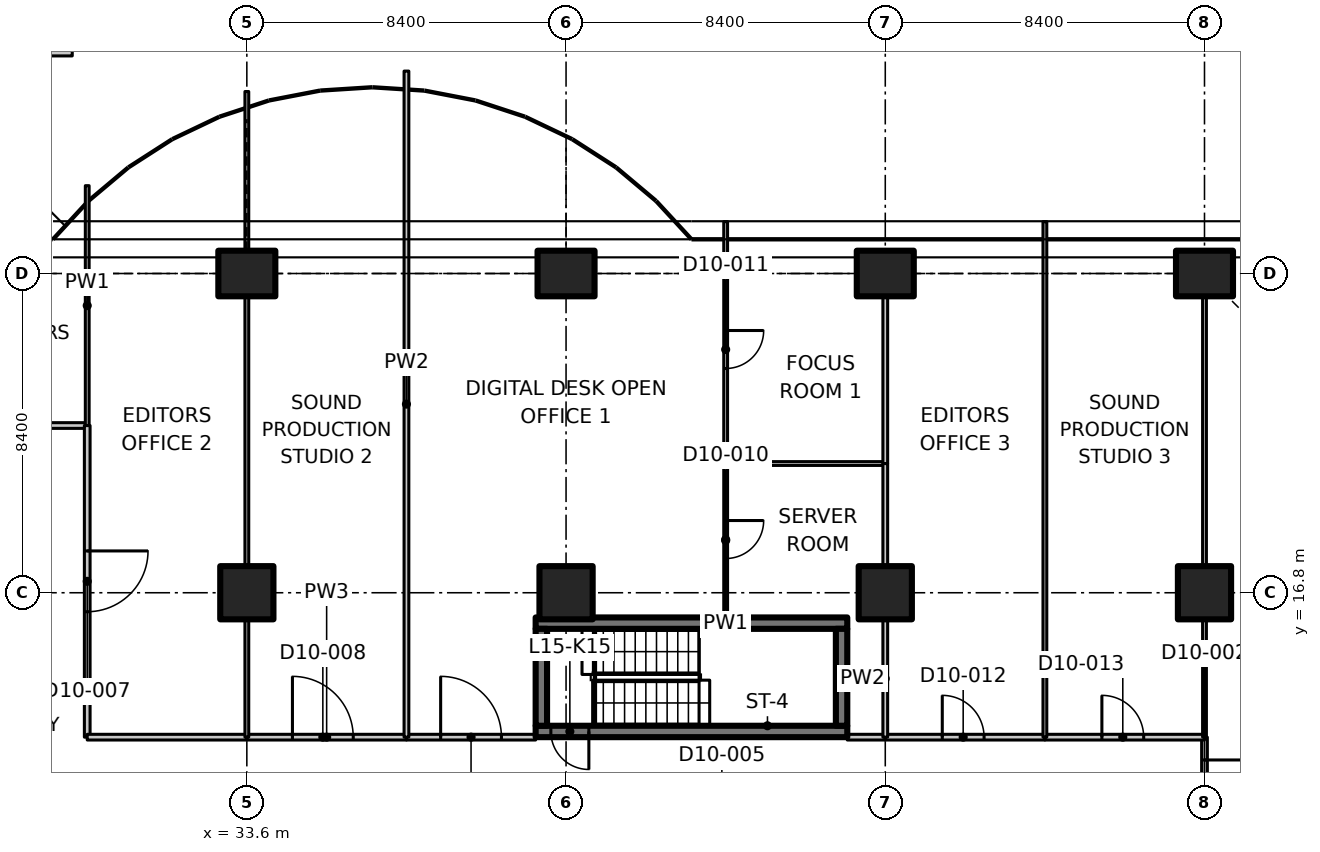
"""IFC4 building model, lengths in metres.
Left out: names, types, materials, properties, quantities, classifications, styles, units other than length and angle.
Written with IfcOpenShell. Run it as: python <this file> out.ifc"""

import sys

from ifc_helpers import new_model, si_unit, direction, frame, frame_2d, origin, origin_2d, place, context, subcontext, project, spatial, polyline, rectangle, outline, extrude, element, fill, save


model = new_model("IFC4")
c1 = context("Model", 3, precision=1e-05, world=origin(), true_north=direction((0.0, 1.0)))
c2 = subcontext(c1, "Body", "Model", "MODEL_VIEW")
j1 = project(units=[si_unit("LENGTHUNIT", "METRE"), si_unit("PLANEANGLEUNIT", "RADIAN")], contexts=[c1])
p1 = place(None, origin())
s1 = spatial("IfcSite", under=j1, at=p1, CompositionType="ELEMENT")
p2 = place(p1, origin())
s2 = spatial("IfcBuilding", under=s1, at=p2, CompositionType="ELEMENT")
p3 = place(p2, frame((0.0, 0.0, 68.9)))
s3 = spatial("IfcBuildingStorey", under=s2, at=p3, CompositionType="ELEMENT", Elevation=68.9)
p4 = place(p3, frame((33.6, 16.8, 0.0), z_axis=(0.0, 0.0, 1.0), x_axis=(1.0, 0.0, 0.0)))
e1 = element("IfcColumn", 1, at=p4, inside=s3, PredefinedType="COLUMN", context=c2, shape_type="SweptSolid", body=[
    extrude(rectangle(XDim=1.4, YDim=1.4, at=origin_2d()), origin(), (0.0, 0.0, 1.0), 3.35),
])
p5 = place(p3, frame((33.6, 25.2, 0.0), z_axis=(0.0, 0.0, 1.0), x_axis=(0.0, 1.0, 0.0)))
e2 = element("IfcColumn", 2, at=p5, inside=s3, PredefinedType="COLUMN", context=c2, shape_type="SweptSolid", body=[
    extrude(rectangle(XDim=1.2, YDim=1.5, at=origin_2d()), origin(), (0.0, 0.0, 1.0), 3.35),
])
p6 = place(p3, frame((42.0, 16.8, 0.0), z_axis=(0.0, 0.0, 1.0), x_axis=(1.0, 0.0, 0.0)))
e3 = element("IfcColumn", 3, at=p6, inside=s3, PredefinedType="COLUMN", context=c2, shape_type="SweptSolid", body=[
    extrude(rectangle(XDim=1.4, YDim=1.4, at=origin_2d()), origin(), (0.0, 0.0, 1.0), 3.35),
])
p7 = place(p3, frame((42.0, 25.2, 0.0), z_axis=(0.0, 0.0, 1.0), x_axis=(0.0, 1.0, 0.0)))
e4 = element("IfcColumn", 4, at=p7, inside=s3, PredefinedType="COLUMN", context=c2, shape_type="SweptSolid", body=[
    extrude(rectangle(XDim=1.2, YDim=1.5, at=origin_2d()), origin(), (0.0, 0.0, 1.0), 3.35),
])
p8 = place(p3, frame((50.4, 16.8, 0.0), z_axis=(0.0, 0.0, 1.0), x_axis=(1.0, 0.0, 0.0)))
e5 = element("IfcColumn", 5, at=p8, inside=s3, PredefinedType="COLUMN", context=c2, shape_type="SweptSolid", body=[
    extrude(rectangle(XDim=1.4, YDim=1.4, at=origin_2d()), origin(), (0.0, 0.0, 1.0), 3.35),
])
p9 = place(p3, frame((50.4, 25.2, 0.0), z_axis=(0.0, 0.0, 1.0), x_axis=(0.0, 1.0, 0.0)))
e6 = element("IfcColumn", 6, at=p9, inside=s3, PredefinedType="COLUMN", context=c2, shape_type="SweptSolid", body=[
    extrude(rectangle(XDim=1.2, YDim=1.5, at=origin_2d()), origin(), (0.0, 0.0, 1.0), 3.35),
])
p10 = place(p3, frame((58.8, 16.8, 0.0), z_axis=(0.0, 0.0, 1.0), x_axis=(1.0, 0.0, 0.0)))
e7 = element("IfcColumn", 7, at=p10, inside=s3, PredefinedType="COLUMN", context=c2, shape_type="SweptSolid", body=[
    extrude(rectangle(XDim=1.4, YDim=1.4, at=origin_2d()), origin(), (0.0, 0.0, 1.0), 3.35),
])
p11 = place(p3, frame((58.8, 25.2, 0.0), z_axis=(0.0, 0.0, 1.0), x_axis=(0.0, 1.0, 0.0)))
e8 = element("IfcColumn", 8, at=p11, inside=s3, PredefinedType="COLUMN", context=c2, shape_type="SweptSolid", body=[
    extrude(rectangle(XDim=1.2, YDim=1.5, at=origin_2d()), origin(), (0.0, 0.0, 1.0), 3.35),
])
p12 = place(p3, frame((49.4, 13.15, 0.0), z_axis=(0.0, 0.0, 1.0), x_axis=(-1.0, 0.0, 0.0)))
e9 = element("IfcWall", 9, at=p12, inside=s3, PredefinedType="SHEAR", context=c2, shape_type="SweptSolid", body=[
    extrude(rectangle(XDim=8.2, YDim=0.3, at=frame_2d((4.1, 0.0))), origin(), (0.0, 0.0, 1.0), 3.35),
])
p13 = place(p12, frame((6.8, 0.0, 0.0)))
e10 = element("IfcOpeningElement", 10, at=p13, cuts=e9, PredefinedType="OPENING", context=c2, shape_type="SweptSolid", body=[
    extrude(rectangle(XDim=1.0, YDim=2.1, at=frame_2d((0.5, 1.05))), frame((0.0, 0.16, 0.0), z_axis=(0.0, -1.0, 0.0), x_axis=(1.0, 0.0, 0.0)), (0.0, 0.0, 1.0), 0.32),
])
p14 = place(p3, frame((41.2, 16.0, 0.0), z_axis=(0.0, 0.0, 1.0), x_axis=(1.0, 0.0, 0.0)))
e11 = element("IfcWall", 11, at=p14, inside=s3, PredefinedType="SHEAR", context=c2, shape_type="SweptSolid", body=[
    extrude(rectangle(XDim=8.2, YDim=0.3, at=frame_2d((4.1, 0.0))), origin(), (0.0, 0.0, 1.0), 3.35),
])
for number, where, z_axis, x_axis in (
    (12, (41.35, 13.3, 0.0), (0.0, 0.0, 1.0), (0.0, 1.0, 0.0)),
    (13, (49.25, 13.3, 0.0), (0.0, 0.0, 1.0), (0.0, 1.0, 0.0)),
):
    element("IfcWall", number, at=place(p3, frame(where, z_axis=z_axis, x_axis=x_axis)), inside=s3, PredefinedType="SHEAR", context=c2, shape_type="SweptSolid", body=[
        extrude(rectangle(XDim=2.55, YDim=0.3, at=frame_2d((1.275, 0.0))), origin(), (0.0, 0.0, 1.0), 3.35),
    ])
p15 = place(p3, frame((25.2, 21.2, 0.0), z_axis=(0.0, 0.0, 1.0), x_axis=(1.0, 0.0, 0.0)))
e14 = element("IfcWall", 14, at=p15, inside=s3, PredefinedType="PARTITIONING", context=c2, shape_type="SweptSolid", body=[
    extrude(rectangle(XDim=4.2, YDim=0.15, at=frame_2d((2.1, 0.0))), origin(), (0.0, 0.0, 1.0), 3.33),
])
p16 = place(p3, frame((29.4, 21.2, 0.0), z_axis=(0.0, 0.0, 1.0), x_axis=(0.0, -1.0, 0.0)))
e15 = element("IfcWall", 15, at=p16, inside=s3, PredefinedType="PARTITIONING", context=c2, shape_type="SweptSolid", body=[
    extrude(rectangle(XDim=8.2, YDim=0.15, at=frame_2d((4.1, 0.0))), origin(), (0.0, 0.0, 1.0), 3.33),
])
p17 = place(p16, frame((3.3, 0.0, 0.0)))
e16 = element("IfcOpeningElement", 16, at=p17, cuts=e15, PredefinedType="OPENING", context=c2, shape_type="SweptSolid", body=[
    extrude(rectangle(XDim=1.6, YDim=2.1, at=frame_2d((0.8, 1.05))), frame((0.0, 0.085, 0.0), z_axis=(0.0, -1.0, 0.0), x_axis=(1.0, 0.0, 0.0)), (0.0, 0.0, 1.0), 0.17),
])
p18 = place(p3, frame((29.4, 27.511, 0.0), z_axis=(0.0, 0.0, 1.0), x_axis=(0.0, -1.0, 0.0)))
e17 = element("IfcWall", 17, at=p18, inside=s3, PredefinedType="PARTITIONING", context=c2, shape_type="SweptSolid", body=[
    extrude(outline(polyline([(0.0, 0.0), (6.311, 0.0), (6.311, 3.33), (2.761, 3.33), (2.759, 2.98), (1.863, 2.98), (1.861, 3.33), (0.236, 3.33), (0.0, 3.33), (0.0, 0.0)])), frame((0.0, 0.05, 0.0), z_axis=(0.0, -1.0, 0.0), x_axis=(1.0, 0.0, 0.0)), (0.0, 0.0, 1.0), 0.1),
])
p19 = place(p3, frame((25.2, 31.0, 0.0), z_axis=(0.0, 0.0, 1.0), x_axis=(1.0, 0.0, 0.0)))
e18 = element("IfcWall", 18, at=p19, inside=s3, PredefinedType="PARTITIONING", context=c2, shape_type="SweptSolid", body=[
    extrude(rectangle(XDim=3.806, YDim=0.15, at=frame_2d((1.903, 0.0))), origin(), (0.0, 0.0, 1.0), 2.98),
])
p20 = place(p3, frame((58.8, 13.0, 0.0), z_axis=(0.0, 0.0, 1.0), x_axis=(0.0, -1.0, 0.0)))
e19 = element("IfcWall", 19, at=p20, inside=s3, PredefinedType="PARTITIONING", context=c2, shape_type="SweptSolid", body=[
    extrude(rectangle(XDim=3.4, YDim=0.15, at=frame_2d((1.7, 0.0))), origin(), (0.0, 0.0, 1.0), 3.33),
])
p21 = place(p20, frame((0.6, 0.0, 0.0)))
e20 = element("IfcOpeningElement", 20, at=p21, cuts=e19, PredefinedType="OPENING", context=c2, shape_type="SweptSolid", body=[
    extrude(rectangle(XDim=2.0, YDim=2.4, at=frame_2d((1.0, 1.2))), frame((0.0, 0.085, 0.0), z_axis=(0.0, -1.0, 0.0), x_axis=(1.0, 0.0, 0.0)), (0.0, 0.0, 1.0), 0.17),
])
p22 = place(p3, frame((29.4, 13.0, 0.0), z_axis=(0.0, 0.0, 1.0), x_axis=(1.0, 0.0, 0.0)))
e21 = element("IfcWall", 21, at=p22, inside=s3, PredefinedType="PARTITIONING", context=c2, shape_type="SweptSolid", body=[
    extrude(rectangle(XDim=4.2, YDim=0.15, at=frame_2d((2.1, 0.0))), origin(), (0.0, 0.0, 1.0), 3.33),
])
p23 = place(p3, frame((33.6, 13.0, 0.0), z_axis=(0.0, 0.0, 1.0), x_axis=(1.0, 0.0, 0.0)))
e22 = element("IfcWall", 22, at=p23, inside=s3, PredefinedType="PARTITIONING", context=c2, shape_type="SweptSolid", body=[
    extrude(rectangle(XDim=4.2, YDim=0.15, at=frame_2d((2.1, 0.0))), origin(), (0.0, 0.0, 1.0), 3.33),
])
p24 = place(p23, frame((1.2, 0.0, 0.0)))
e23 = element("IfcOpeningElement", 23, at=p24, cuts=e22, PredefinedType="OPENING", context=c2, shape_type="SweptSolid", body=[
    extrude(rectangle(XDim=1.6, YDim=2.1, at=frame_2d((0.8, 1.05))), frame((0.0, 0.085, 0.0), z_axis=(0.0, -1.0, 0.0), x_axis=(1.0, 0.0, 0.0)), (0.0, 0.0, 1.0), 0.17),
])
p25 = place(p3, frame((37.8, 13.0, 0.0), z_axis=(0.0, 0.0, 1.0), x_axis=(1.0, 0.0, 0.0)))
e24 = element("IfcWall", 24, at=p25, inside=s3, PredefinedType="PARTITIONING", context=c2, shape_type="SweptSolid", body=[
    extrude(rectangle(XDim=3.4, YDim=0.15, at=frame_2d((1.7, 0.0))), origin(), (0.0, 0.0, 1.0), 3.33),
])
p26 = place(p25, frame((0.9, 0.0, 0.0)))
e25 = element("IfcOpeningElement", 25, at=p26, cuts=e24, PredefinedType="OPENING", context=c2, shape_type="SweptSolid", body=[
    extrude(rectangle(XDim=1.6, YDim=2.1, at=frame_2d((0.8, 1.05))), frame((0.0, 0.085, 0.0), z_axis=(0.0, -1.0, 0.0), x_axis=(1.0, 0.0, 0.0)), (0.0, 0.0, 1.0), 0.17),
])
p27 = place(p3, frame((49.4, 13.0, 0.0), z_axis=(0.0, 0.0, 1.0), x_axis=(1.0, 0.0, 0.0)))
e26 = element("IfcWall", 26, at=p27, inside=s3, PredefinedType="PARTITIONING", context=c2, shape_type="SweptSolid", body=[
    extrude(rectangle(XDim=1.0, YDim=0.15, at=frame_2d((0.5, 0.0))), origin(), (0.0, 0.0, 1.0), 3.33),
])
p28 = place(p3, frame((50.4, 13.0, 0.0), z_axis=(0.0, 0.0, 1.0), x_axis=(1.0, 0.0, 0.0)))
e27 = element("IfcWall", 27, at=p28, inside=s3, PredefinedType="PARTITIONING", context=c2, shape_type="SweptSolid", body=[
    extrude(rectangle(XDim=4.2, YDim=0.15, at=frame_2d((2.1, 0.0))), origin(), (0.0, 0.0, 1.0), 3.33),
])
p29 = place(p28, frame((1.5, 0.0, 0.0)))
e28 = element("IfcOpeningElement", 28, at=p29, cuts=e27, PredefinedType="OPENING", context=c2, shape_type="SweptSolid", body=[
    extrude(rectangle(XDim=1.1, YDim=2.1, at=frame_2d((0.55, 1.05))), frame((0.0, 0.085, 0.0), z_axis=(0.0, -1.0, 0.0), x_axis=(1.0, 0.0, 0.0)), (0.0, 0.0, 1.0), 0.17),
])
p30 = place(p3, frame((54.6, 13.0, 0.0), z_axis=(0.0, 0.0, 1.0), x_axis=(1.0, 0.0, 0.0)))
e29 = element("IfcWall", 29, at=p30, inside=s3, PredefinedType="PARTITIONING", context=c2, shape_type="SweptSolid", body=[
    extrude(rectangle(XDim=4.2, YDim=0.15, at=frame_2d((2.1, 0.0))), origin(), (0.0, 0.0, 1.0), 3.33),
])
p31 = place(p30, frame((1.5, 0.0, 0.0)))
e30 = element("IfcOpeningElement", 30, at=p31, cuts=e29, PredefinedType="OPENING", context=c2, shape_type="SweptSolid", body=[
    extrude(rectangle(XDim=1.1, YDim=2.1, at=frame_2d((0.55, 1.05))), frame((0.0, 0.085, 0.0), z_axis=(0.0, -1.0, 0.0), x_axis=(1.0, 0.0, 0.0)), (0.0, 0.0, 1.0), 0.17),
])
p32 = place(p3, frame((58.8, 13.0, 0.0), z_axis=(0.0, 0.0, 1.0), x_axis=(0.0, 1.0, 0.0)))
e31 = element("IfcWall", 31, at=p32, inside=s3, PredefinedType="PARTITIONING", context=c2, shape_type="SweptSolid", body=[
    extrude(rectangle(XDim=3.08, YDim=0.1, at=frame_2d((1.54, 0.0))), origin(), (0.0, 0.0, 1.0), 3.33),
])
p33 = place(p3, frame((58.8, 17.52, 0.0), z_axis=(0.0, 0.0, 1.0), x_axis=(0.0, 1.0, 0.0)))
e32 = element("IfcWall", 32, at=p33, inside=s3, PredefinedType="PARTITIONING", context=c2, shape_type="SweptSolid", body=[
    extrude(rectangle(XDim=7.06, YDim=0.1, at=frame_2d((3.53, 0.0))), origin(), (0.0, 0.0, 1.0), 3.33),
])
p34 = place(p3, frame((33.6, 29.988, 0.0), z_axis=(0.0, 0.0, 1.0), x_axis=(0.0, -1.0, 0.0)))
e33 = element("IfcWall", 33, at=p34, inside=s3, PredefinedType="PARTITIONING", context=c2, shape_type="SweptSolid", body=[
    extrude(rectangle(XDim=4.168, YDim=0.1, at=frame_2d((2.084, 0.0))), origin(), (0.0, 0.0, 1.0), 2.98),
])
p35 = place(p3, frame((33.6, 24.58, 0.0), z_axis=(0.0, 0.0, 1.0), x_axis=(0.0, -1.0, 0.0)))
e34 = element("IfcWall", 34, at=p35, inside=s3, PredefinedType="PARTITIONING", context=c2, shape_type="SweptSolid", body=[
    extrude(rectangle(XDim=7.06, YDim=0.1, at=frame_2d((3.53, 0.0))), origin(), (0.0, 0.0, 1.0), 3.33),
])
p36 = place(p3, frame((33.6, 16.08, 0.0), z_axis=(0.0, 0.0, 1.0), x_axis=(0.0, -1.0, 0.0)))
e35 = element("IfcWall", 35, at=p36, inside=s3, PredefinedType="PARTITIONING", context=c2, shape_type="SweptSolid", body=[
    extrude(rectangle(XDim=3.08, YDim=0.1, at=frame_2d((1.54, 0.0))), origin(), (0.0, 0.0, 1.0), 3.33),
])
p37 = place(p3, frame((37.8, 30.526, 0.0), z_axis=(0.0, 0.0, 1.0), x_axis=(0.0, -1.0, 0.0)))
e36 = element("IfcWall", 36, at=p37, inside=s3, PredefinedType="PARTITIONING", context=c2, shape_type="SweptSolid", body=[
    extrude(outline(polyline([(0.0, 0.0), (17.526, 0.0), (17.526, 3.33), (5.776, 3.33), (5.774, 2.98), (4.878, 2.98), (4.876, 3.33), (0.283, 3.33), (0.0, 3.33), (0.0, 0.0)])), frame((0.0, 0.062, 0.0), z_axis=(0.0, -1.0, 0.0), x_axis=(1.0, 0.0, 0.0)), (0.0, 0.0, 1.0), 0.125),
])
p38 = place(p3, frame((46.2, 20.2, 0.0), z_axis=(0.0, 0.0, 1.0), x_axis=(0.0, -1.0, 0.0)))
e37 = element("IfcWall", 37, at=p38, inside=s3, PredefinedType="PARTITIONING", context=c2, shape_type="SweptSolid", body=[
    extrude(rectangle(XDim=4.05, YDim=0.1, at=frame_2d((2.025, 0.0))), origin(), (0.0, 0.0, 1.0), 3.33),
])
p39 = place(p38, frame((1.5, 0.0, 0.0)))
e38 = element("IfcOpeningElement", 38, at=p39, cuts=e37, PredefinedType="OPENING", context=c2, shape_type="SweptSolid", body=[
    extrude(rectangle(XDim=1.0, YDim=2.1, at=frame_2d((0.5, 1.05))), frame((0.0, 0.06, 0.0), z_axis=(0.0, -1.0, 0.0), x_axis=(1.0, 0.0, 0.0)), (0.0, 0.0, 1.0), 0.12),
])
p40 = place(p3, frame((46.2, 26.565, 0.0), z_axis=(0.0, 0.0, 1.0), x_axis=(0.0, -1.0, 0.0)))
e39 = element("IfcWall", 39, at=p40, inside=s3, PredefinedType="PARTITIONING", context=c2, shape_type="SweptSolid", body=[
    extrude(outline(polyline([(0.0, 0.0), (6.365, 0.0), (6.365, 3.33), (1.815, 3.33), (1.813, 2.98), (0.917, 2.98), (0.915, 3.33), (0.265, 3.33), (0.0, 3.33), (0.0, 0.0)])), frame((0.0, 0.05, 0.0), z_axis=(0.0, -1.0, 0.0), x_axis=(1.0, 0.0, 0.0)), (0.0, 0.0, 1.0), 0.1),
])
p41 = place(p40, frame((2.865, 0.0, 0.0)))
e40 = element("IfcOpeningElement", 40, at=p41, cuts=e39, PredefinedType="OPENING", context=c2, shape_type="SweptSolid", body=[
    extrude(rectangle(XDim=1.0, YDim=2.1, at=frame_2d((0.5, 1.05))), frame((0.0, 0.06, 0.0), z_axis=(0.0, -1.0, 0.0), x_axis=(1.0, 0.0, 0.0)), (0.0, 0.0, 1.0), 0.12),
])
p42 = place(p3, frame((46.2, 20.2, 0.0), z_axis=(0.0, 0.0, 1.0), x_axis=(1.0, 0.0, 0.0)))
e41 = element("IfcWall", 41, at=p42, inside=s3, PredefinedType="PARTITIONING", context=c2, shape_type="SweptSolid", body=[
    extrude(rectangle(XDim=4.2, YDim=0.1, at=frame_2d((2.1, 0.0))), origin(), (0.0, 0.0, 1.0), 3.33),
])
p43 = place(p3, frame((50.4, 20.2, 0.0), z_axis=(0.0, 0.0, 1.0), x_axis=(0.0, -1.0, 0.0)))
e42 = element("IfcWall", 42, at=p43, inside=s3, PredefinedType="PARTITIONING", context=c2, shape_type="SweptSolid", body=[
    extrude(rectangle(XDim=2.68, YDim=0.125, at=frame_2d((1.34, 0.0))), origin(), (0.0, 0.0, 1.0), 3.33),
])
p44 = place(p3, frame((50.4, 16.08, 0.0), z_axis=(0.0, 0.0, 1.0), x_axis=(0.0, -1.0, 0.0)))
e43 = element("IfcWall", 43, at=p44, inside=s3, PredefinedType="PARTITIONING", context=c2, shape_type="SweptSolid", body=[
    extrude(rectangle(XDim=3.08, YDim=0.125, at=frame_2d((1.54, 0.0))), origin(), (0.0, 0.0, 1.0), 3.33),
])
p45 = place(p3, frame((50.4, 24.58, 0.0), z_axis=(0.0, 0.0, 1.0), x_axis=(0.0, -1.0, 0.0)))
e44 = element("IfcWall", 44, at=p45, inside=s3, PredefinedType="PARTITIONING", context=c2, shape_type="SweptSolid", body=[
    extrude(rectangle(XDim=4.38, YDim=0.125, at=frame_2d((2.19, 0.0))), origin(), (0.0, 0.0, 1.0), 3.33),
])
p46 = place(p3, frame((54.6, 26.565, 0.0), z_axis=(0.0, 0.0, 1.0), x_axis=(0.0, -1.0, 0.0)))
e45 = element("IfcWall", 45, at=p46, inside=s3, PredefinedType="PARTITIONING", context=c2, shape_type="SweptSolid", body=[
    extrude(outline(polyline([(0.0, 0.0), (13.565, 0.0), (13.565, 3.33), (1.815, 3.33), (1.813, 2.98), (0.917, 2.98), (0.915, 3.33), (0.265, 3.33), (0.0, 3.33), (0.0, 0.0)])), frame((0.0, 0.05, 0.0), z_axis=(0.0, -1.0, 0.0), x_axis=(1.0, 0.0, 0.0)), (0.0, 0.0, 1.0), 0.1),
])
p47 = place(p13, origin())
e46 = element("IfcDoor", 46, at=p47, inside=s3, OperationType="SINGLE_SWING_LEFT", PredefinedType="DOOR", context=c2, shape_type="SweptSolid", body=[
    extrude(rectangle(XDim=1.0, YDim=2.1, at=frame_2d((0.5, 1.05))), frame((0.0, 0.025, 0.0), z_axis=(0.0, -1.0, 0.0), x_axis=(1.0, 0.0, 0.0)), (0.0, 0.0, 1.0), 0.05),
])
fill(e10, e46)
p48 = place(p21, origin())
e47 = element("IfcDoor", 47, at=p48, inside=s3, OperationType="DOUBLE_DOOR_SINGLE_SWING", PredefinedType="DOOR", context=c2, shape_type="SweptSolid", body=[
    extrude(rectangle(XDim=2.0, YDim=2.4, at=frame_2d((1.0, 1.2))), frame((0.0, 0.025, 0.0), z_axis=(0.0, -1.0, 0.0), x_axis=(1.0, 0.0, 0.0)), (0.0, 0.0, 1.0), 0.05),
])
fill(e20, e47)
p49 = place(p17, origin())
e48 = element("IfcDoor", 48, at=p49, inside=s3, OperationType="DOUBLE_DOOR_SINGLE_SWING", PredefinedType="DOOR", context=c2, shape_type="SweptSolid", body=[
    extrude(rectangle(XDim=1.6, YDim=2.1, at=frame_2d((0.8, 1.05))), frame((0.0, 0.025, 0.0), z_axis=(0.0, -1.0, 0.0), x_axis=(1.0, 0.0, 0.0)), (0.0, 0.0, 1.0), 0.05),
])
fill(e16, e48)
p50 = place(p24, origin())
e49 = element("IfcDoor", 49, at=p50, inside=s3, OperationType="DOUBLE_DOOR_SINGLE_SWING", PredefinedType="DOOR", context=c2, shape_type="SweptSolid", body=[
    extrude(rectangle(XDim=1.6, YDim=2.1, at=frame_2d((0.8, 1.05))), frame((0.0, 0.025, 0.0), z_axis=(0.0, -1.0, 0.0), x_axis=(1.0, 0.0, 0.0)), (0.0, 0.0, 1.0), 0.05),
])
fill(e23, e49)
p51 = place(p26, origin())
e50 = element("IfcDoor", 50, at=p51, inside=s3, OperationType="DOUBLE_DOOR_SINGLE_SWING", PredefinedType="DOOR", context=c2, shape_type="SweptSolid", body=[
    extrude(rectangle(XDim=1.6, YDim=2.1, at=frame_2d((0.8, 1.05))), frame((0.0, 0.025, 0.0), z_axis=(0.0, -1.0, 0.0), x_axis=(1.0, 0.0, 0.0)), (0.0, 0.0, 1.0), 0.05),
])
fill(e25, e50)
p52 = place(p39, origin())
e51 = element("IfcDoor", 51, at=p52, inside=s3, OperationType="SINGLE_SWING_LEFT", PredefinedType="DOOR", context=c2, shape_type="SweptSolid", body=[
    extrude(rectangle(XDim=1.0, YDim=2.1, at=frame_2d((0.5, 1.05))), frame((0.0, 0.025, 0.0), z_axis=(0.0, -1.0, 0.0), x_axis=(1.0, 0.0, 0.0)), (0.0, 0.0, 1.0), 0.05),
])
fill(e38, e51)
p53 = place(p41, origin())
e52 = element("IfcDoor", 52, at=p53, inside=s3, OperationType="SINGLE_SWING_LEFT", PredefinedType="DOOR", context=c2, shape_type="SweptSolid", body=[
    extrude(rectangle(XDim=1.0, YDim=2.1, at=frame_2d((0.5, 1.05))), frame((0.0, 0.025, 0.0), z_axis=(0.0, -1.0, 0.0), x_axis=(1.0, 0.0, 0.0)), (0.0, 0.0, 1.0), 0.05),
])
fill(e40, e52)
p54 = place(p29, origin())
e53 = element("IfcDoor", 53, at=p54, inside=s3, OperationType="SINGLE_SWING_LEFT", PredefinedType="DOOR", context=c2, shape_type="SweptSolid", body=[
    extrude(rectangle(XDim=1.1, YDim=2.1, at=frame_2d((0.55, 1.05))), frame((0.0, 0.025, 0.0), z_axis=(0.0, -1.0, 0.0), x_axis=(1.0, 0.0, 0.0)), (0.0, 0.0, 1.0), 0.05),
])
fill(e28, e53)
p55 = place(p31, origin())
e54 = element("IfcDoor", 54, at=p55, inside=s3, OperationType="SINGLE_SWING_LEFT", PredefinedType="DOOR", context=c2, shape_type="SweptSolid", body=[
    extrude(rectangle(XDim=1.1, YDim=2.1, at=frame_2d((0.55, 1.05))), frame((0.0, 0.025, 0.0), z_axis=(0.0, -1.0, 0.0), x_axis=(1.0, 0.0, 0.0)), (0.0, 0.0, 1.0), 0.05),
])
fill(e30, e54)
save(model, sys.argv[1])
